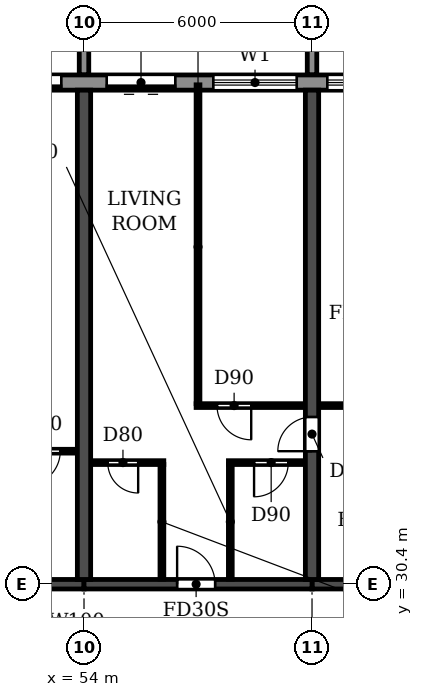
"""IFC4 building model, lengths in metres.
Left out: names, types, materials, properties, quantities, classifications, styles, units other than length and angle.
Written with IfcOpenShell. Run it as: python <this file> out.ifc"""

import sys

from ifc_helpers import new_model, si_unit, direction, frame, frame_2d, origin, place, context, subcontext, project, spatial, polyline, rectangle, outline, extrude, source, transform, mapped, element, fill, save


model = new_model("IFC4")
c1 = context("Model", 3, precision=1e-05, world=origin(), true_north=direction((0.0, 1.0)))
c2 = subcontext(c1, "Body", "Model", "MODEL_VIEW")
j1 = project(units=[si_unit("LENGTHUNIT", "METRE"), si_unit("PLANEANGLEUNIT", "RADIAN")], contexts=[c1])
p1 = place(None, origin())
s1 = spatial("IfcSite", under=j1, at=p1, CompositionType="ELEMENT")
p2 = place(p1, origin())
s2 = spatial("IfcBuilding", under=s1, at=p2, CompositionType="ELEMENT")
p3 = place(p2, frame((0.0, 0.0, 92.7)))
s3 = spatial("IfcBuildingStorey", under=s2, at=p3, CompositionType="ELEMENT", Elevation=92.7)
p4 = place(p3, frame((54.0, 30.525, 0.0), z_axis=(0.0, 0.0, 1.0), x_axis=(0.0, 1.0, 0.0)))
e1 = element("IfcWall", 1, at=p4, inside=s3, PredefinedType="SHEAR", context=c2, shape_type="SweptSolid", body=[
    extrude(rectangle(XDim=12.875, YDim=0.35, at=frame_2d((6.438, 0.0))), origin(), (0.0, 0.0, 1.0), 3.06),
])
p5 = place(p3, frame((60.0, 30.525, 0.0), z_axis=(0.0, 0.0, 1.0), x_axis=(0.0, 1.0, 0.0)))
e2 = element("IfcWall", 2, at=p5, inside=s3, PredefinedType="SHEAR", context=c2, shape_type="SweptSolid", body=[
    extrude(rectangle(XDim=12.875, YDim=0.35, at=frame_2d((6.438, 0.0))), origin(), (0.0, 0.0, 1.0), 3.06),
])
p6 = place(p5, frame((3.375, 0.0, 0.0)))
e3 = element("IfcOpeningElement", 3, at=p6, cuts=e2, PredefinedType="OPENING", context=c2, shape_type="SweptSolid", body=[
    extrude(rectangle(XDim=0.9, YDim=2.1, at=frame_2d((0.45, 1.05))), frame((0.0, 0.185, 0.0), z_axis=(0.0, -1.0, 0.0), x_axis=(1.0, 0.0, 0.0)), (0.0, 0.0, 1.0), 0.37),
])
p7 = place(p3, frame((48.0, 30.4, 0.0), z_axis=(0.0, 0.0, 1.0), x_axis=(1.0, 0.0, 0.0)))
e4 = element("IfcWall", 4, at=p7, inside=s3, PredefinedType="SHEAR", context=c2, shape_type="SweptSolid", body=[
    extrude(rectangle(XDim=6.0, YDim=0.25, at=frame_2d((3.0, 0.0))), origin(), (0.0, 0.0, 1.0), 2.46),
])
p8 = place(p7, frame((2.45, 0.0, 0.0)))
e5 = element("IfcOpeningElement", 5, at=p8, cuts=e4, PredefinedType="OPENING", context=c2, shape_type="SweptSolid", body=[
    extrude(rectangle(XDim=1.0, YDim=2.1, at=frame_2d((0.5, 1.05))), frame((0.0, 0.135, 0.0), z_axis=(0.0, -1.0, 0.0), x_axis=(1.0, 0.0, 0.0)), (0.0, 0.0, 1.0), 0.27),
])
p9 = place(p3, frame((54.0, 30.4, 0.0), z_axis=(0.0, 0.0, 1.0), x_axis=(1.0, 0.0, 0.0)))
e6 = element("IfcWall", 6, at=p9, inside=s3, PredefinedType="SHEAR", context=c2, shape_type="SweptSolid", body=[
    extrude(rectangle(XDim=6.0, YDim=0.25, at=frame_2d((3.0, 0.0))), origin(), (0.0, 0.0, 1.0), 2.46),
])
p10 = place(p9, frame((2.45, 0.0, 0.0)))
e7 = element("IfcOpeningElement", 7, at=p10, cuts=e6, PredefinedType="OPENING", context=c2, shape_type="SweptSolid", body=[
    extrude(rectangle(XDim=1.0, YDim=2.1, at=frame_2d((0.5, 1.05))), frame((0.0, 0.135, 0.0), z_axis=(0.0, -1.0, 0.0), x_axis=(1.0, 0.0, 0.0)), (0.0, 0.0, 1.0), 0.27),
])
p11 = place(p3, frame((60.0, 30.4, 0.0), z_axis=(0.0, 0.0, 1.0), x_axis=(1.0, 0.0, 0.0)))
e8 = element("IfcWall", 8, at=p11, inside=s3, PredefinedType="SHEAR", context=c2, shape_type="SweptSolid", body=[
    extrude(rectangle(XDim=6.0, YDim=0.25, at=frame_2d((3.0, 0.0))), origin(), (0.0, 0.0, 1.0), 2.46),
])
p12 = place(p3, frame((91.317, 43.6, 0.0), z_axis=(0.0, 0.0, 1.0), x_axis=(-1.0, 0.0, 0.0)))
e9 = element("IfcWall", 9, at=p12, inside=s3, PredefinedType="STANDARD", context=c2, shape_type="SweptSolid", body=[
    extrude(rectangle(XDim=80.634, YDim=0.4, at=frame_2d((40.317, 0.0))), origin(), (0.0, 0.0, 1.0), 3.06),
])
p13 = place(p12, frame((76.717, 0.0, 0.9)))
e10 = element("IfcOpeningElement", 10, at=p13, cuts=e9, PredefinedType="OPENING", context=c2, shape_type="SweptSolid", body=[
    extrude(rectangle(XDim=2.2, YDim=1.5, at=frame_2d((1.1, 0.75))), frame((0.0, 0.21, 0.0), z_axis=(0.0, -1.0, 0.0), x_axis=(1.0, 0.0, 0.0)), (0.0, 0.0, 1.0), 0.42),
])
p14 = place(p12, frame((73.917, 0.0, 0.0)))
e11 = element("IfcOpeningElement", 11, at=p14, cuts=e9, PredefinedType="OPENING", context=c2, shape_type="SweptSolid", body=[
    extrude(rectangle(XDim=1.8, YDim=2.4, at=frame_2d((0.9, 1.2))), frame((0.0, 0.21, 0.0), z_axis=(0.0, -1.0, 0.0), x_axis=(1.0, 0.0, 0.0)), (0.0, 0.0, 1.0), 0.42),
])
p15 = place(p12, frame((70.717, 0.0, 0.9)))
e12 = element("IfcOpeningElement", 12, at=p15, cuts=e9, PredefinedType="OPENING", context=c2, shape_type="SweptSolid", body=[
    extrude(rectangle(XDim=2.2, YDim=1.5, at=frame_2d((1.1, 0.75))), frame((0.0, 0.21, 0.0), z_axis=(0.0, -1.0, 0.0), x_axis=(1.0, 0.0, 0.0)), (0.0, 0.0, 1.0), 0.42),
])
p16 = place(p12, frame((67.717, 0.0, 0.9)))
e13 = element("IfcOpeningElement", 13, at=p16, cuts=e9, PredefinedType="OPENING", context=c2, shape_type="SweptSolid", body=[
    extrude(rectangle(XDim=2.2, YDim=1.5, at=frame_2d((1.1, 0.75))), frame((0.0, 0.21, 0.0), z_axis=(0.0, -1.0, 0.0), x_axis=(1.0, 0.0, 0.0)), (0.0, 0.0, 1.0), 0.42),
])
p17 = place(p12, frame((64.717, 0.0, 0.9)))
e14 = element("IfcOpeningElement", 14, at=p17, cuts=e9, PredefinedType="OPENING", context=c2, shape_type="SweptSolid", body=[
    extrude(rectangle(XDim=2.2, YDim=1.5, at=frame_2d((1.1, 0.75))), frame((0.0, 0.21, 0.0), z_axis=(0.0, -1.0, 0.0), x_axis=(1.0, 0.0, 0.0)), (0.0, 0.0, 1.0), 0.42),
])
p18 = place(p12, frame((61.917, 0.0, 0.0)))
e15 = element("IfcOpeningElement", 15, at=p18, cuts=e9, PredefinedType="OPENING", context=c2, shape_type="SweptSolid", body=[
    extrude(rectangle(XDim=1.8, YDim=2.4, at=frame_2d((0.9, 1.2))), frame((0.0, 0.21, 0.0), z_axis=(0.0, -1.0, 0.0), x_axis=(1.0, 0.0, 0.0)), (0.0, 0.0, 1.0), 0.42),
])
p19 = place(p12, frame((58.717, 0.0, 0.9)))
e16 = element("IfcOpeningElement", 16, at=p19, cuts=e9, PredefinedType="OPENING", context=c2, shape_type="SweptSolid", body=[
    extrude(rectangle(XDim=2.2, YDim=1.5, at=frame_2d((1.1, 0.75))), frame((0.0, 0.21, 0.0), z_axis=(0.0, -1.0, 0.0), x_axis=(1.0, 0.0, 0.0)), (0.0, 0.0, 1.0), 0.42),
])
p20 = place(p12, frame((55.717, 0.0, 0.9)))
e17 = element("IfcOpeningElement", 17, at=p20, cuts=e9, PredefinedType="OPENING", context=c2, shape_type="SweptSolid", body=[
    extrude(rectangle(XDim=2.2, YDim=1.5, at=frame_2d((1.1, 0.75))), frame((0.0, 0.21, 0.0), z_axis=(0.0, -1.0, 0.0), x_axis=(1.0, 0.0, 0.0)), (0.0, 0.0, 1.0), 0.42),
])
p21 = place(p12, frame((52.917, 0.0, 0.0)))
e18 = element("IfcOpeningElement", 18, at=p21, cuts=e9, PredefinedType="OPENING", context=c2, shape_type="SweptSolid", body=[
    extrude(rectangle(XDim=1.8, YDim=2.4, at=frame_2d((0.9, 1.2))), frame((0.0, 0.21, 0.0), z_axis=(0.0, -1.0, 0.0), x_axis=(1.0, 0.0, 0.0)), (0.0, 0.0, 1.0), 0.42),
])
p22 = place(p12, frame((49.717, 0.0, 0.9)))
e19 = element("IfcOpeningElement", 19, at=p22, cuts=e9, PredefinedType="OPENING", context=c2, shape_type="SweptSolid", body=[
    extrude(rectangle(XDim=2.2, YDim=1.5, at=frame_2d((1.1, 0.75))), frame((0.0, 0.21, 0.0), z_axis=(0.0, -1.0, 0.0), x_axis=(1.0, 0.0, 0.0)), (0.0, 0.0, 1.0), 0.42),
])
p23 = place(p12, frame((46.717, 0.0, 0.9)))
e20 = element("IfcOpeningElement", 20, at=p23, cuts=e9, PredefinedType="OPENING", context=c2, shape_type="SweptSolid", body=[
    extrude(rectangle(XDim=2.2, YDim=1.5, at=frame_2d((1.1, 0.75))), frame((0.0, 0.21, 0.0), z_axis=(0.0, -1.0, 0.0), x_axis=(1.0, 0.0, 0.0)), (0.0, 0.0, 1.0), 0.42),
])
p24 = place(p12, frame((43.717, 0.0, 0.9)))
e21 = element("IfcOpeningElement", 21, at=p24, cuts=e9, PredefinedType="OPENING", context=c2, shape_type="SweptSolid", body=[
    extrude(rectangle(XDim=2.2, YDim=1.5, at=frame_2d((1.1, 0.75))), frame((0.0, 0.21, 0.0), z_axis=(0.0, -1.0, 0.0), x_axis=(1.0, 0.0, 0.0)), (0.0, 0.0, 1.0), 0.42),
])
p25 = place(p12, frame((40.717, 0.0, 0.9)))
e22 = element("IfcOpeningElement", 22, at=p25, cuts=e9, PredefinedType="OPENING", context=c2, shape_type="SweptSolid", body=[
    extrude(rectangle(XDim=2.2, YDim=1.5, at=frame_2d((1.1, 0.75))), frame((0.0, 0.21, 0.0), z_axis=(0.0, -1.0, 0.0), x_axis=(1.0, 0.0, 0.0)), (0.0, 0.0, 1.0), 0.42),
])
p26 = place(p12, frame((37.917, 0.0, 0.0)))
e23 = element("IfcOpeningElement", 23, at=p26, cuts=e9, PredefinedType="OPENING", context=c2, shape_type="SweptSolid", body=[
    extrude(rectangle(XDim=1.8, YDim=2.4, at=frame_2d((0.9, 1.2))), frame((0.0, 0.21, 0.0), z_axis=(0.0, -1.0, 0.0), x_axis=(1.0, 0.0, 0.0)), (0.0, 0.0, 1.0), 0.42),
])
p27 = place(p12, frame((34.917, 0.0, 0.0)))
e24 = element("IfcOpeningElement", 24, at=p27, cuts=e9, PredefinedType="OPENING", context=c2, shape_type="SweptSolid", body=[
    extrude(rectangle(XDim=1.8, YDim=2.4, at=frame_2d((0.9, 1.2))), frame((0.0, 0.21, 0.0), z_axis=(0.0, -1.0, 0.0), x_axis=(1.0, 0.0, 0.0)), (0.0, 0.0, 1.0), 0.42),
])
p28 = place(p12, frame((31.717, 0.0, 0.9)))
e25 = element("IfcOpeningElement", 25, at=p28, cuts=e9, PredefinedType="OPENING", context=c2, shape_type="SweptSolid", body=[
    extrude(rectangle(XDim=2.2, YDim=1.5, at=frame_2d((1.1, 0.75))), frame((0.0, 0.21, 0.0), z_axis=(0.0, -1.0, 0.0), x_axis=(1.0, 0.0, 0.0)), (0.0, 0.0, 1.0), 0.42),
])
p29 = place(p12, frame((28.717, 0.0, 0.9)))
e26 = element("IfcOpeningElement", 26, at=p29, cuts=e9, PredefinedType="OPENING", context=c2, shape_type="SweptSolid", body=[
    extrude(rectangle(XDim=2.2, YDim=1.5, at=frame_2d((1.1, 0.75))), frame((0.0, 0.21, 0.0), z_axis=(0.0, -1.0, 0.0), x_axis=(1.0, 0.0, 0.0)), (0.0, 0.0, 1.0), 0.42),
])
p30 = place(p12, frame((25.717, 0.0, 0.9)))
e27 = element("IfcOpeningElement", 27, at=p30, cuts=e9, PredefinedType="OPENING", context=c2, shape_type="SweptSolid", body=[
    extrude(rectangle(XDim=2.2, YDim=1.5, at=frame_2d((1.1, 0.75))), frame((0.0, 0.21, 0.0), z_axis=(0.0, -1.0, 0.0), x_axis=(1.0, 0.0, 0.0)), (0.0, 0.0, 1.0), 0.42),
])
p31 = place(p12, frame((22.717, 0.0, 0.9)))
e28 = element("IfcOpeningElement", 28, at=p31, cuts=e9, PredefinedType="OPENING", context=c2, shape_type="SweptSolid", body=[
    extrude(rectangle(XDim=2.2, YDim=1.5, at=frame_2d((1.1, 0.75))), frame((0.0, 0.21, 0.0), z_axis=(0.0, -1.0, 0.0), x_axis=(1.0, 0.0, 0.0)), (0.0, 0.0, 1.0), 0.42),
])
p32 = place(p12, frame((19.917, 0.0, 0.0)))
e29 = element("IfcOpeningElement", 29, at=p32, cuts=e9, PredefinedType="OPENING", context=c2, shape_type="SweptSolid", body=[
    extrude(rectangle(XDim=1.8, YDim=2.4, at=frame_2d((0.9, 1.2))), frame((0.0, 0.21, 0.0), z_axis=(0.0, -1.0, 0.0), x_axis=(1.0, 0.0, 0.0)), (0.0, 0.0, 1.0), 0.42),
])
p33 = place(p12, frame((16.717, 0.0, 0.9)))
e30 = element("IfcOpeningElement", 30, at=p33, cuts=e9, PredefinedType="OPENING", context=c2, shape_type="SweptSolid", body=[
    extrude(rectangle(XDim=2.2, YDim=1.5, at=frame_2d((1.1, 0.75))), frame((0.0, 0.21, 0.0), z_axis=(0.0, -1.0, 0.0), x_axis=(1.0, 0.0, 0.0)), (0.0, 0.0, 1.0), 0.42),
])
p34 = place(p12, frame((13.917, 0.0, 0.0)))
e31 = element("IfcOpeningElement", 31, at=p34, cuts=e9, PredefinedType="OPENING", context=c2, shape_type="SweptSolid", body=[
    extrude(rectangle(XDim=1.8, YDim=2.4, at=frame_2d((0.9, 1.2))), frame((0.0, 0.21, 0.0), z_axis=(0.0, -1.0, 0.0), x_axis=(1.0, 0.0, 0.0)), (0.0, 0.0, 1.0), 0.42),
])
p35 = place(p12, frame((10.717, 0.0, 0.9)))
e32 = element("IfcOpeningElement", 32, at=p35, cuts=e9, PredefinedType="OPENING", context=c2, shape_type="SweptSolid", body=[
    extrude(rectangle(XDim=2.2, YDim=1.5, at=frame_2d((1.1, 0.75))), frame((0.0, 0.21, 0.0), z_axis=(0.0, -1.0, 0.0), x_axis=(1.0, 0.0, 0.0)), (0.0, 0.0, 1.0), 0.42),
])
p36 = place(p12, frame((7.917, 0.0, 0.0)))
e33 = element("IfcOpeningElement", 33, at=p36, cuts=e9, PredefinedType="OPENING", context=c2, shape_type="SweptSolid", body=[
    extrude(rectangle(XDim=1.8, YDim=2.4, at=frame_2d((0.9, 1.2))), frame((0.0, 0.21, 0.0), z_axis=(0.0, -1.0, 0.0), x_axis=(1.0, 0.0, 0.0)), (0.0, 0.0, 1.0), 0.42),
])
p37 = place(p12, frame((4.717, 0.0, 0.9)))
e34 = element("IfcOpeningElement", 34, at=p37, cuts=e9, PredefinedType="OPENING", context=c2, shape_type="SweptSolid", body=[
    extrude(rectangle(XDim=2.2, YDim=1.5, at=frame_2d((1.1, 0.75))), frame((0.0, 0.21, 0.0), z_axis=(0.0, -1.0, 0.0), x_axis=(1.0, 0.0, 0.0)), (0.0, 0.0, 1.0), 0.42),
])
p38 = place(p12, frame((1.917, 0.0, 0.0)))
e35 = element("IfcOpeningElement", 35, at=p38, cuts=e9, PredefinedType="OPENING", context=c2, shape_type="SweptSolid", body=[
    extrude(rectangle(XDim=1.8, YDim=2.4, at=frame_2d((0.9, 1.2))), frame((0.0, 0.21, 0.0), z_axis=(0.0, -1.0, 0.0), x_axis=(1.0, 0.0, 0.0)), (0.0, 0.0, 1.0), 0.42),
])
m1 = source(origin(), c2, "Body", "SweptSolid", [
    extrude(outline(polyline([(0.0, 0.0), (0.25, 0.0), (0.25, 3.1), (0.0, 3.1), (0.0, 0.0)])), origin(), (0.0, 0.0, 1.0), 3.1),
])
for number, where in (
    (36, (53.875, 43.8, 0.0)),
    (37, (59.875, 43.8, 0.0)),
):
    element("IfcWall", number, at=place(p3, frame(where)), inside=s3, PredefinedType="STANDARD", context=c2, shape_type="MappedRepresentation", body=[
        mapped(m1, transform((0.0, 0.0, 0.0))),
    ])
p39 = place(p3, frame((54.185, 33.6, 0.0), z_axis=(0.0, 0.0, 1.0), x_axis=(1.0, 0.0, 0.0)))
e38 = element("IfcWall", 38, at=p39, inside=s3, PredefinedType="PARTITIONING", context=c2, shape_type="SweptSolid", body=[
    extrude(rectangle(XDim=1.915, YDim=0.1, at=frame_2d((0.958, 0.0))), origin(), (0.0, 0.0, 1.0), 3.06),
])
p40 = place(p39, frame((0.44, 0.0, 0.0)))
e39 = element("IfcOpeningElement", 39, at=p40, cuts=e38, PredefinedType="OPENING", context=c2, shape_type="SweptSolid", body=[
    extrude(rectangle(XDim=0.8, YDim=2.1, at=frame_2d((0.4, 1.05))), frame((0.0, 0.06, 0.0), z_axis=(0.0, -1.0, 0.0), x_axis=(1.0, 0.0, 0.0)), (0.0, 0.0, 1.0), 0.12),
])
p41 = place(p3, frame((57.8, 33.6, 0.0), z_axis=(0.0, 0.0, 1.0), x_axis=(1.0, 0.0, 0.0)))
e40 = element("IfcWall", 40, at=p41, inside=s3, PredefinedType="PARTITIONING", context=c2, shape_type="SweptSolid", body=[
    extrude(rectangle(XDim=2.015, YDim=0.1, at=frame_2d((1.007, 0.0))), origin(), (0.0, 0.0, 1.0), 3.06),
])
p42 = place(p41, frame((0.675, 0.0, 0.0)))
e41 = element("IfcOpeningElement", 41, at=p42, cuts=e40, PredefinedType="OPENING", context=c2, shape_type="SweptSolid", body=[
    extrude(rectangle(XDim=0.9, YDim=2.1, at=frame_2d((0.45, 1.05))), frame((0.0, 0.06, 0.0), z_axis=(0.0, -1.0, 0.0), x_axis=(1.0, 0.0, 0.0)), (0.0, 0.0, 1.0), 0.12),
])
p43 = place(p3, frame((51.8, 33.9, 0.0), z_axis=(0.0, 0.0, 1.0), x_axis=(1.0, 0.0, 0.0)))
e42 = element("IfcWall", 42, at=p43, inside=s3, PredefinedType="PARTITIONING", context=c2, shape_type="SweptSolid", body=[
    extrude(rectangle(XDim=2.015, YDim=0.1, at=frame_2d((1.007, 0.0))), origin(), (0.0, 0.0, 1.0), 3.06),
])
p44 = place(p43, frame((0.675, 0.0, 0.0)))
e43 = element("IfcOpeningElement", 43, at=p44, cuts=e42, PredefinedType="OPENING", context=c2, shape_type="SweptSolid", body=[
    extrude(rectangle(XDim=0.9, YDim=2.1, at=frame_2d((0.45, 1.05))), frame((0.0, 0.06, 0.0), z_axis=(0.0, -1.0, 0.0), x_axis=(1.0, 0.0, 0.0)), (0.0, 0.0, 1.0), 0.12),
])
p45 = place(p3, frame((56.95, 35.1, 0.0), z_axis=(0.0, 0.0, 1.0), x_axis=(1.0, 0.0, 0.0)))
e44 = element("IfcWall", 44, at=p45, inside=s3, PredefinedType="PARTITIONING", context=c2, shape_type="SweptSolid", body=[
    extrude(rectangle(XDim=2.865, YDim=0.1, at=frame_2d((1.433, 0.0))), origin(), (0.0, 0.0, 1.0), 3.06),
])
p46 = place(p45, frame((0.55, 0.0, 0.0)))
e45 = element("IfcOpeningElement", 45, at=p46, cuts=e44, PredefinedType="OPENING", context=c2, shape_type="SweptSolid", body=[
    extrude(rectangle(XDim=0.9, YDim=2.1, at=frame_2d((0.45, 1.05))), frame((0.0, 0.06, 0.0), z_axis=(0.0, -1.0, 0.0), x_axis=(1.0, 0.0, 0.0)), (0.0, 0.0, 1.0), 0.12),
])
p47 = place(p3, frame((60.185, 35.1, 0.0), z_axis=(0.0, 0.0, 1.0), x_axis=(1.0, 0.0, 0.0)))
e46 = element("IfcWall", 46, at=p47, inside=s3, PredefinedType="PARTITIONING", context=c2, shape_type="SweptSolid", body=[
    extrude(rectangle(XDim=5.63, YDim=0.1, at=frame_2d((2.815, 0.0))), origin(), (0.0, 0.0, 1.0), 3.06),
])
p48 = place(p47, frame((1.415, 0.0, 0.0)))
e47 = element("IfcOpeningElement", 47, at=p48, cuts=e46, PredefinedType="OPENING", context=c2, shape_type="SweptSolid", body=[
    extrude(rectangle(XDim=0.9, YDim=2.1, at=frame_2d((0.45, 1.05))), frame((0.0, 0.06, 0.0), z_axis=(0.0, -1.0, 0.0), x_axis=(1.0, 0.0, 0.0)), (0.0, 0.0, 1.0), 0.12),
])
p49 = place(p47, frame((3.315, 0.0, 0.0)))
e48 = element("IfcOpeningElement", 48, at=p49, cuts=e46, PredefinedType="OPENING", context=c2, shape_type="SweptSolid", body=[
    extrude(rectangle(XDim=0.9, YDim=2.1, at=frame_2d((0.45, 1.05))), frame((0.0, 0.06, 0.0), z_axis=(0.0, -1.0, 0.0), x_axis=(1.0, 0.0, 0.0)), (0.0, 0.0, 1.0), 0.12),
])
p50 = place(p3, frame((56.05, 30.535, 0.0), z_axis=(0.0, 0.0, 1.0), x_axis=(0.0, 1.0, 0.0)))
e49 = element("IfcWall", 49, at=p50, inside=s3, PredefinedType="PARTITIONING", context=c2, shape_type="SweptSolid", body=[
    extrude(rectangle(XDim=3.015, YDim=0.1, at=frame_2d((1.508, 0.0))), origin(), (0.0, 0.0, 1.0), 3.06),
])
p51 = place(p3, frame((57.0, 35.15, 0.0), z_axis=(0.0, 0.0, 1.0), x_axis=(0.0, 1.0, 0.0)))
e50 = element("IfcWall", 50, at=p51, inside=s3, PredefinedType="PARTITIONING", context=c2, shape_type="SweptSolid", body=[
    extrude(rectangle(XDim=8.39, YDim=0.1, at=frame_2d((4.195, 0.0))), origin(), (0.0, 0.0, 1.0), 3.06),
])
p52 = place(p3, frame((57.85, 30.535, 0.0), z_axis=(0.0, 0.0, 1.0), x_axis=(0.0, 1.0, 0.0)))
e51 = element("IfcWall", 51, at=p52, inside=s3, PredefinedType="PARTITIONING", context=c2, shape_type="SweptSolid", body=[
    extrude(rectangle(XDim=3.015, YDim=0.1, at=frame_2d((1.508, 0.0))), origin(), (0.0, 0.0, 1.0), 3.06),
])
p53 = place(p26, origin())
e52 = element("IfcDoor", 52, at=p53, inside=s3, OperationType="DOUBLE_DOOR_SLIDING", PredefinedType="DOOR", context=c2, shape_type="SweptSolid", body=[
    extrude(rectangle(XDim=1.8, YDim=2.4, at=frame_2d((0.9, 1.2))), frame((0.0, 0.025, 0.0), z_axis=(0.0, -1.0, 0.0), x_axis=(1.0, 0.0, 0.0)), (0.0, 0.0, 1.0), 0.05),
])
fill(e23, e52)
p54 = place(p27, origin())
e53 = element("IfcDoor", 53, at=p54, inside=s3, OperationType="DOUBLE_DOOR_SLIDING", PredefinedType="DOOR", context=c2, shape_type="SweptSolid", body=[
    extrude(rectangle(XDim=1.8, YDim=2.4, at=frame_2d((0.9, 1.2))), frame((0.0, 0.025, 0.0), z_axis=(0.0, -1.0, 0.0), x_axis=(1.0, 0.0, 0.0)), (0.0, 0.0, 1.0), 0.05),
])
fill(e24, e53)
p55 = place(p28, origin())
e54 = element("IfcWindow", 54, at=p55, inside=s3, PartitioningType="DOUBLE_PANEL_HORIZONTAL", PredefinedType="WINDOW", context=c2, shape_type="SweptSolid", body=[
    extrude(rectangle(XDim=2.2, YDim=1.5, at=frame_2d((1.1, 0.75))), frame((0.0, 0.03, 0.0), z_axis=(0.0, -1.0, 0.0), x_axis=(1.0, 0.0, 0.0)), (0.0, 0.0, 1.0), 0.06),
])
fill(e25, e54)
p56 = place(p29, origin())
e55 = element("IfcWindow", 55, at=p56, inside=s3, PartitioningType="DOUBLE_PANEL_HORIZONTAL", PredefinedType="WINDOW", context=c2, shape_type="SweptSolid", body=[
    extrude(rectangle(XDim=2.2, YDim=1.5, at=frame_2d((1.1, 0.75))), frame((0.0, 0.03, 0.0), z_axis=(0.0, -1.0, 0.0), x_axis=(1.0, 0.0, 0.0)), (0.0, 0.0, 1.0), 0.06),
])
fill(e26, e55)
p57 = place(p44, frame((0.9, 0.0, 0.0), z_axis=(0.0, 0.0, 1.0), x_axis=(-1.0, 0.0, 0.0)))
e56 = element("IfcDoor", 56, at=p57, inside=s3, OperationType="SINGLE_SWING_RIGHT", PredefinedType="DOOR", context=c2, shape_type="SweptSolid", body=[
    extrude(rectangle(XDim=0.9, YDim=2.1, at=frame_2d((0.45, 1.05))), frame((0.0, 0.025, 0.0), z_axis=(0.0, -1.0, 0.0), x_axis=(1.0, 0.0, 0.0)), (0.0, 0.0, 1.0), 0.05),
])
fill(e43, e56)
p58 = place(p40, frame((0.8, 0.0, 0.0), z_axis=(0.0, 0.0, 1.0), x_axis=(-1.0, 0.0, 0.0)))
e57 = element("IfcDoor", 57, at=p58, inside=s3, OperationType="SINGLE_SWING_LEFT", PredefinedType="DOOR", context=c2, shape_type="SweptSolid", body=[
    extrude(rectangle(XDim=0.8, YDim=2.1, at=frame_2d((0.4, 1.05))), frame((0.0, 0.025, 0.0), z_axis=(0.0, -1.0, 0.0), x_axis=(1.0, 0.0, 0.0)), (0.0, 0.0, 1.0), 0.05),
])
fill(e39, e57)
p59 = place(p10, origin())
e58 = element("IfcDoor", 58, at=p59, inside=s3, OperationType="SINGLE_SWING_LEFT", PredefinedType="DOOR", context=c2, shape_type="SweptSolid", body=[
    extrude(rectangle(XDim=1.0, YDim=2.1, at=frame_2d((0.5, 1.05))), frame((0.0, 0.025, 0.0), z_axis=(0.0, -1.0, 0.0), x_axis=(1.0, 0.0, 0.0)), (0.0, 0.0, 1.0), 0.05),
])
fill(e7, e58)
p60 = place(p46, frame((0.9, 0.0, 0.0), z_axis=(0.0, 0.0, 1.0), x_axis=(-1.0, 0.0, 0.0)))
e59 = element("IfcDoor", 59, at=p60, inside=s3, OperationType="SINGLE_SWING_LEFT", PredefinedType="DOOR", context=c2, shape_type="SweptSolid", body=[
    extrude(rectangle(XDim=0.9, YDim=2.1, at=frame_2d((0.45, 1.05))), frame((0.0, 0.025, 0.0), z_axis=(0.0, -1.0, 0.0), x_axis=(1.0, 0.0, 0.0)), (0.0, 0.0, 1.0), 0.05),
])
fill(e45, e59)
p61 = place(p42, frame((0.9, 0.0, 0.0), z_axis=(0.0, 0.0, 1.0), x_axis=(-1.0, 0.0, 0.0)))
e60 = element("IfcDoor", 60, at=p61, inside=s3, OperationType="SINGLE_SWING_RIGHT", PredefinedType="DOOR", context=c2, shape_type="SweptSolid", body=[
    extrude(rectangle(XDim=0.9, YDim=2.1, at=frame_2d((0.45, 1.05))), frame((0.0, 0.025, 0.0), z_axis=(0.0, -1.0, 0.0), x_axis=(1.0, 0.0, 0.0)), (0.0, 0.0, 1.0), 0.05),
])
fill(e41, e60)
p62 = place(p6, origin())
e61 = element("IfcDoor", 61, at=p62, inside=s3, OperationType="SINGLE_SWING_LEFT", PredefinedType="DOOR", context=c2, shape_type="SweptSolid", body=[
    extrude(rectangle(XDim=0.9, YDim=2.1, at=frame_2d((0.45, 1.05))), frame((0.0, 0.025, 0.0), z_axis=(0.0, -1.0, 0.0), x_axis=(1.0, 0.0, 0.0)), (0.0, 0.0, 1.0), 0.05),
])
fill(e3, e61)
save(model, sys.argv[1])
